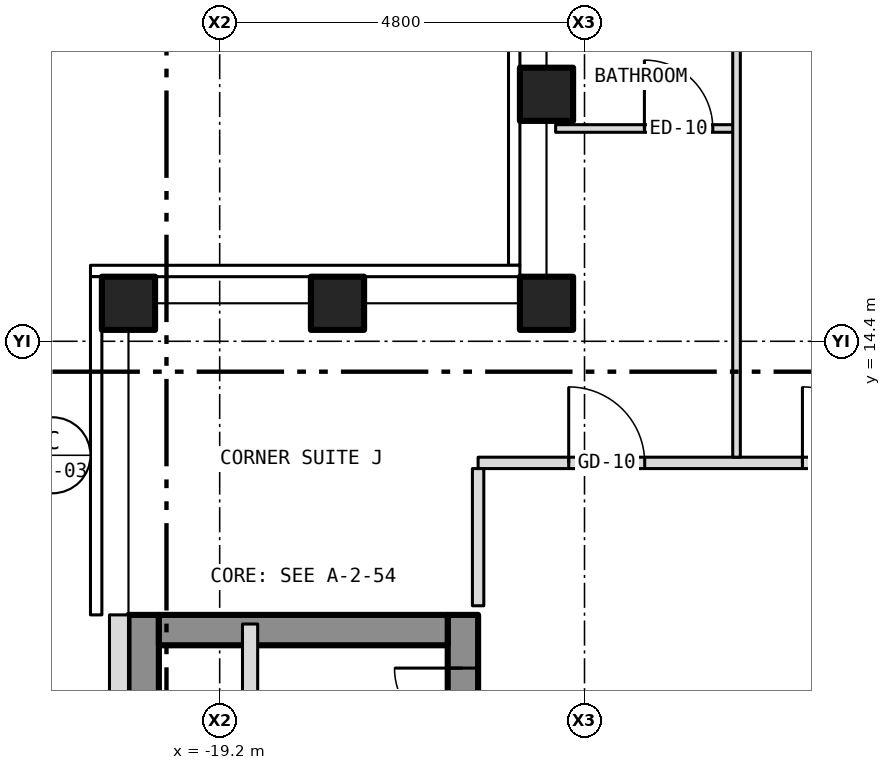
"""IFC4 building model, lengths in metres.
Left out: names, types, materials, properties, quantities, classifications, styles, units other than length and angle.
Written with IfcOpenShell. Run it as: python <this file> out.ifc"""

import sys

from ifc_helpers import new_model, si_unit, direction, frame, frame_2d, origin, origin_2d, place, context, subcontext, project, spatial, rectangle, hollow_rectangle, extrude, element, fill, save


model = new_model("IFC4")
c1 = context("Model", 3, precision=1e-05, world=origin(), true_north=direction((0.0, 1.0)))
c2 = subcontext(c1, "Body", "Model", "MODEL_VIEW")
j1 = project(units=[si_unit("LENGTHUNIT", "METRE"), si_unit("PLANEANGLEUNIT", "RADIAN")], contexts=[c1])
p1 = place(None, origin())
s1 = spatial("IfcSite", under=j1, at=p1, CompositionType="ELEMENT")
p2 = place(p1, origin())
s2 = spatial("IfcBuilding", under=s1, at=p2, CompositionType="ELEMENT")
p3 = place(p2, frame((0.0, 0.0, 198.0)))
s3 = spatial("IfcBuildingStorey", under=s2, at=p3, CompositionType="ELEMENT", Elevation=198.0)
for number, where, z_axis, x_axis in (
    (1, (-20.4, 14.9, -0.15), (0.0, 0.0, 1.0), (1.0, 0.0, 0.0)),
    (2, (-14.9, 14.9, -0.15), (0.0, 0.0, 1.0), (1.0, 0.0, 0.0)),
    (3, (-14.9, 17.65, -0.15), (0.0, 0.0, 1.0), (1.0, 0.0, 0.0)),
    (4, (-17.65, 14.9, -0.15), (0.0, 0.0, 1.0), (1.0, 0.0, 0.0)),
):
    element("IfcColumn", number, at=place(p3, frame(where, z_axis=z_axis, x_axis=x_axis)), inside=s3, PredefinedType="COLUMN", context=c2, shape_type="SweptSolid", body=[
        extrude(hollow_rectangle(XDim=0.7, YDim=0.7, WallThickness=0.04, at=origin_2d()), origin(), (0.0, 0.0, 1.0), 3.5),
    ])
p4 = place(p3, frame((-16.0, -10.8, 0.0), z_axis=(0.0, 0.0, 1.0), x_axis=(0.0, 1.0, 0.0)))
e5 = element("IfcWall", 5, at=p4, inside=s3, PredefinedType="SHEAR", context=c2, shape_type="SweptSolid", body=[
    extrude(rectangle(XDim=21.6, YDim=0.4, at=frame_2d((10.8, 0.0))), origin(), (0.0, 0.0, 1.0), 3.25),
])
p5 = place(p4, frame((9.4, 0.0, 0.0)))
e6 = element("IfcOpeningElement", 6, at=p5, cuts=e5, PredefinedType="OPENING", context=c2, shape_type="SweptSolid", body=[
    extrude(rectangle(XDim=1.1, YDim=2.1, at=frame_2d((0.55, 1.05))), frame((0.0, 0.212, 0.0), z_axis=(0.0, -1.0, 0.0), x_axis=(1.0, 0.0, 0.0)), (0.0, 0.0, 1.0), 0.424),
])
p6 = place(p4, frame((11.5, 0.0, 0.0)))
e7 = element("IfcOpeningElement", 7, at=p6, cuts=e5, PredefinedType="OPENING", context=c2, shape_type="SweptSolid", body=[
    extrude(rectangle(XDim=1.1, YDim=2.1, at=frame_2d((0.55, 1.05))), frame((0.0, 0.212, 0.0), z_axis=(0.0, -1.0, 0.0), x_axis=(1.0, 0.0, 0.0)), (0.0, 0.0, 1.0), 0.424),
])
p7 = place(p4, frame((13.6, 0.0, 0.0)))
e8 = element("IfcOpeningElement", 8, at=p7, cuts=e5, PredefinedType="OPENING", context=c2, shape_type="SweptSolid", body=[
    extrude(rectangle(XDim=1.1, YDim=2.1, at=frame_2d((0.55, 1.05))), frame((0.0, 0.212, 0.0), z_axis=(0.0, -1.0, 0.0), x_axis=(1.0, 0.0, 0.0)), (0.0, 0.0, 1.0), 0.424),
])
p8 = place(p4, frame((15.7, 0.0, 0.0)))
e9 = element("IfcOpeningElement", 9, at=p8, cuts=e5, PredefinedType="OPENING", context=c2, shape_type="SweptSolid", body=[
    extrude(rectangle(XDim=1.1, YDim=2.1, at=frame_2d((0.55, 1.05))), frame((0.0, 0.212, 0.0), z_axis=(0.0, -1.0, 0.0), x_axis=(1.0, 0.0, 0.0)), (0.0, 0.0, 1.0), 0.424),
])
p9 = place(p4, frame((17.8, 0.0, 0.0)))
e10 = element("IfcOpeningElement", 10, at=p9, cuts=e5, PredefinedType="OPENING", context=c2, shape_type="SweptSolid", body=[
    extrude(rectangle(XDim=1.1, YDim=2.1, at=frame_2d((0.55, 1.05))), frame((0.0, 0.212, 0.0), z_axis=(0.0, -1.0, 0.0), x_axis=(1.0, 0.0, 0.0)), (0.0, 0.0, 1.0), 0.424),
])
p10 = place(p4, frame((0.458, 0.0, 0.0)))
e11 = element("IfcOpeningElement", 11, at=p10, cuts=e5, PredefinedType="OPENING", context=c2, shape_type="SweptSolid", body=[
    extrude(rectangle(XDim=1.1, YDim=2.1, at=frame_2d((0.55, 1.05))), frame((0.0, 0.212, 0.0), z_axis=(0.0, -1.0, 0.0), x_axis=(1.0, 0.0, 0.0)), (0.0, 0.0, 1.0), 0.424),
])
p11 = place(p4, frame((7.5, 0.0, 0.0)))
e12 = element("IfcOpeningElement", 12, at=p11, cuts=e5, PredefinedType="OPENING", context=c2, shape_type="SweptSolid", body=[
    extrude(rectangle(XDim=1.1, YDim=2.1, at=frame_2d((0.55, 1.05))), frame((0.0, 0.212, 0.0), z_axis=(0.0, -1.0, 0.0), x_axis=(1.0, 0.0, 0.0)), (0.0, 0.0, 1.0), 0.424),
])
p12 = place(p4, frame((20.0, 0.0, 0.0)))
e13 = element("IfcOpeningElement", 13, at=p12, cuts=e5, PredefinedType="OPENING", context=c2, shape_type="SweptSolid", body=[
    extrude(rectangle(XDim=0.9, YDim=2.1, at=frame_2d((0.45, 1.05))), frame((0.0, 0.212, 0.0), z_axis=(0.0, -1.0, 0.0), x_axis=(1.0, 0.0, 0.0)), (0.0, 0.0, 1.0), 0.424),
])
p13 = place(p3, frame((-20.2, -10.8, 0.0), z_axis=(0.0, 0.0, 1.0), x_axis=(0.0, 1.0, 0.0)))
e14 = element("IfcWall", 14, at=p13, inside=s3, PredefinedType="SHEAR", context=c2, shape_type="SweptSolid", body=[
    extrude(rectangle(XDim=21.6, YDim=0.4, at=frame_2d((10.8, 0.0))), origin(), (0.0, 0.0, 1.0), 3.25),
])
p14 = place(p3, frame((-20.0, 10.6, 0.0), z_axis=(0.0, 0.0, 1.0), x_axis=(1.0, 0.0, 0.0)))
e15 = element("IfcWall", 15, at=p14, inside=s3, PredefinedType="SHEAR", context=c2, shape_type="SweptSolid", body=[
    extrude(rectangle(XDim=3.8, YDim=0.4, at=frame_2d((1.9, 0.0))), origin(), (0.0, 0.0, 1.0), 3.25),
])
p15 = place(p3, frame((-20.525, 10.8, 0.0), z_axis=(0.0, 0.0, 1.0), x_axis=(0.0, -1.0, 0.0)))
e16 = element("IfcWall", 16, at=p15, inside=s3, PredefinedType="SOLIDWALL", context=c2, shape_type="SweptSolid", body=[
    extrude(rectangle(XDim=21.6, YDim=0.25, at=frame_2d((10.8, 0.0))), origin(), (0.0, 0.0, 1.0), 3.5),
])
p16 = place(p15, frame((18.05, 0.0, 1.0)))
e17 = element("IfcOpeningElement", 17, at=p16, cuts=e16, PredefinedType="OPENING", context=c2, shape_type="SweptSolid", body=[
    extrude(rectangle(XDim=0.6, YDim=1.5, at=frame_2d((0.3, 0.75))), frame((0.0, 0.137, 0.0), z_axis=(0.0, -1.0, 0.0), x_axis=(1.0, 0.0, 0.0)), (0.0, 0.0, 1.0), 0.274),
])
p17 = place(p3, frame((-15.8, 12.8, 0.0), z_axis=(0.0, 0.0, 1.0), x_axis=(1.0, 0.0, 0.0)))
e18 = element("IfcWall", 18, at=p17, inside=s3, PredefinedType="PARTITIONING", context=c2, shape_type="SweptSolid", body=[
    extrude(rectangle(XDim=31.6, YDim=0.15, at=frame_2d((15.8, 0.0))), origin(), (0.0, 0.0, 1.0), 3.35),
])
p18 = place(p17, frame((4.267, 0.0, 0.0)))
e19 = element("IfcOpeningElement", 19, at=p18, cuts=e18, PredefinedType="OPENING", context=c2, shape_type="SweptSolid", body=[
    extrude(rectangle(XDim=1.0, YDim=2.1, at=frame_2d((0.5, 1.05))), frame((0.0, 0.087, 0.0), z_axis=(0.0, -1.0, 0.0), x_axis=(1.0, 0.0, 0.0)), (0.0, 0.0, 1.0), 0.174),
])
p19 = place(p17, frame((12.675, 0.0, 0.0)))
e20 = element("IfcOpeningElement", 20, at=p19, cuts=e18, PredefinedType="OPENING", context=c2, shape_type="SweptSolid", body=[
    extrude(rectangle(XDim=1.0, YDim=2.1, at=frame_2d((0.5, 1.05))), frame((0.0, 0.087, 0.0), z_axis=(0.0, -1.0, 0.0), x_axis=(1.0, 0.0, 0.0)), (0.0, 0.0, 1.0), 0.174),
])
p20 = place(p17, frame((16.684, 0.0, 0.0)))
e21 = element("IfcOpeningElement", 21, at=p20, cuts=e18, PredefinedType="OPENING", context=c2, shape_type="SweptSolid", body=[
    extrude(rectangle(XDim=1.0, YDim=2.1, at=frame_2d((0.5, 1.05))), frame((0.0, 0.087, 0.0), z_axis=(0.0, -1.0, 0.0), x_axis=(1.0, 0.0, 0.0)), (0.0, 0.0, 1.0), 0.174),
])
p21 = place(p17, frame((25.092, 0.0, 0.0)))
e22 = element("IfcOpeningElement", 22, at=p21, cuts=e18, PredefinedType="OPENING", context=c2, shape_type="SweptSolid", body=[
    extrude(rectangle(XDim=1.0, YDim=2.1, at=frame_2d((0.5, 1.05))), frame((0.0, 0.087, 0.0), z_axis=(0.0, -1.0, 0.0), x_axis=(1.0, 0.0, 0.0)), (0.0, 0.0, 1.0), 0.174),
])
p22 = place(p17, frame((1.192, 0.0, 0.0)))
e23 = element("IfcOpeningElement", 23, at=p22, cuts=e18, PredefinedType="OPENING", context=c2, shape_type="SweptSolid", body=[
    extrude(rectangle(XDim=1.0, YDim=2.1, at=frame_2d((0.5, 1.05))), frame((0.0, 0.087, 0.0), z_axis=(0.0, -1.0, 0.0), x_axis=(1.0, 0.0, 0.0)), (0.0, 0.0, 1.0), 0.174),
])
p23 = place(p17, frame((29.409, 0.0, 0.0)))
e24 = element("IfcOpeningElement", 24, at=p23, cuts=e18, PredefinedType="OPENING", context=c2, shape_type="SweptSolid", body=[
    extrude(rectangle(XDim=1.0, YDim=2.1, at=frame_2d((0.5, 1.05))), frame((0.0, 0.087, 0.0), z_axis=(0.0, -1.0, 0.0), x_axis=(1.0, 0.0, 0.0)), (0.0, 0.0, 1.0), 0.174),
])
p24 = place(p3, frame((-14.78, 17.2, 0.0), z_axis=(0.0, 0.0, 1.0), x_axis=(1.0, 0.0, 0.0)))
e25 = element("IfcWall", 25, at=p24, inside=s3, PredefinedType="PARTITIONING", context=c2, shape_type="SweptSolid", body=[
    extrude(rectangle(XDim=2.38, YDim=0.1, at=frame_2d((1.19, 0.0))), origin(), (0.0, 0.0, 1.0), 3.35),
])
p25 = place(p24, frame((1.168, 0.0, 0.0)))
e26 = element("IfcOpeningElement", 26, at=p25, cuts=e25, PredefinedType="OPENING", context=c2, shape_type="SweptSolid", body=[
    extrude(rectangle(XDim=0.9, YDim=2.1, at=frame_2d((0.45, 1.05))), frame((0.0, 0.062, 0.0), z_axis=(0.0, -1.0, 0.0), x_axis=(1.0, 0.0, 0.0)), (0.0, 0.0, 1.0), 0.124),
])
p26 = place(p3, frame((-18.8, -1.8, 0.0), z_axis=(0.0, 0.0, 1.0), x_axis=(0.0, 1.0, 0.0)))
e27 = element("IfcWall", 27, at=p26, inside=s3, PredefinedType="PARTITIONING", context=c2, shape_type="SweptSolid", body=[
    extrude(rectangle(XDim=12.48, YDim=0.2, at=frame_2d((6.24, 0.0))), origin(), (0.0, 0.0, 1.0), 3.25),
])
p27 = place(p3, frame((-15.8, 10.92, 0.0), z_axis=(0.0, 0.0, 1.0), x_axis=(0.0, 1.0, 0.0)))
e28 = element("IfcWall", 28, at=p27, inside=s3, PredefinedType="PARTITIONING", context=c2, shape_type="SweptSolid", body=[
    extrude(rectangle(XDim=1.805, YDim=0.15, at=frame_2d((0.903, 0.0))), origin(), (0.0, 0.0, 1.0), 3.35),
])
p28 = place(p3, frame((-12.4, 12.875, 0.0), z_axis=(0.0, 0.0, 1.0), x_axis=(0.0, 1.0, 0.0)))
e29 = element("IfcWall", 29, at=p28, inside=s3, PredefinedType="PARTITIONING", context=c2, shape_type="SweptSolid", body=[
    extrude(rectangle(XDim=7.905, YDim=0.1, at=frame_2d((3.953, 0.0))), origin(), (0.0, 0.0, 1.0), 3.35),
])
p29 = place(p12, origin())
e30 = element("IfcDoor", 30, at=p29, inside=s3, OperationType="SINGLE_SWING_RIGHT", PredefinedType="DOOR", context=c2, shape_type="SweptSolid", body=[
    extrude(rectangle(XDim=0.9, YDim=2.1, at=frame_2d((0.45, 1.05))), frame((0.0, 0.025, 0.0), z_axis=(0.0, -1.0, 0.0), x_axis=(1.0, 0.0, 0.0)), (0.0, 0.0, 1.0), 0.05),
])
fill(e13, e30)
p30 = place(p18, origin())
e31 = element("IfcDoor", 31, at=p30, inside=s3, OperationType="SINGLE_SWING_LEFT", PredefinedType="DOOR", context=c2, shape_type="SweptSolid", body=[
    extrude(rectangle(XDim=1.0, YDim=2.1, at=frame_2d((0.5, 1.05))), frame((0.0, 0.025, 0.0), z_axis=(0.0, -1.0, 0.0), x_axis=(1.0, 0.0, 0.0)), (0.0, 0.0, 1.0), 0.05),
])
fill(e19, e31)
p31 = place(p25, origin())
e32 = element("IfcDoor", 32, at=p31, inside=s3, OperationType="SINGLE_SWING_LEFT", PredefinedType="DOOR", context=c2, shape_type="SweptSolid", body=[
    extrude(rectangle(XDim=0.9, YDim=2.1, at=frame_2d((0.45, 1.05))), frame((0.0, 0.025, 0.0), z_axis=(0.0, -1.0, 0.0), x_axis=(1.0, 0.0, 0.0)), (0.0, 0.0, 1.0), 0.05),
])
fill(e26, e32)
p32 = place(p22, origin())
e33 = element("IfcDoor", 33, at=p32, inside=s3, OperationType="SINGLE_SWING_LEFT", PredefinedType="DOOR", context=c2, shape_type="SweptSolid", body=[
    extrude(rectangle(XDim=1.0, YDim=2.1, at=frame_2d((0.5, 1.05))), frame((0.0, 0.025, 0.0), z_axis=(0.0, -1.0, 0.0), x_axis=(1.0, 0.0, 0.0)), (0.0, 0.0, 1.0), 0.05),
])
fill(e23, e33)
save(model, sys.argv[1])
